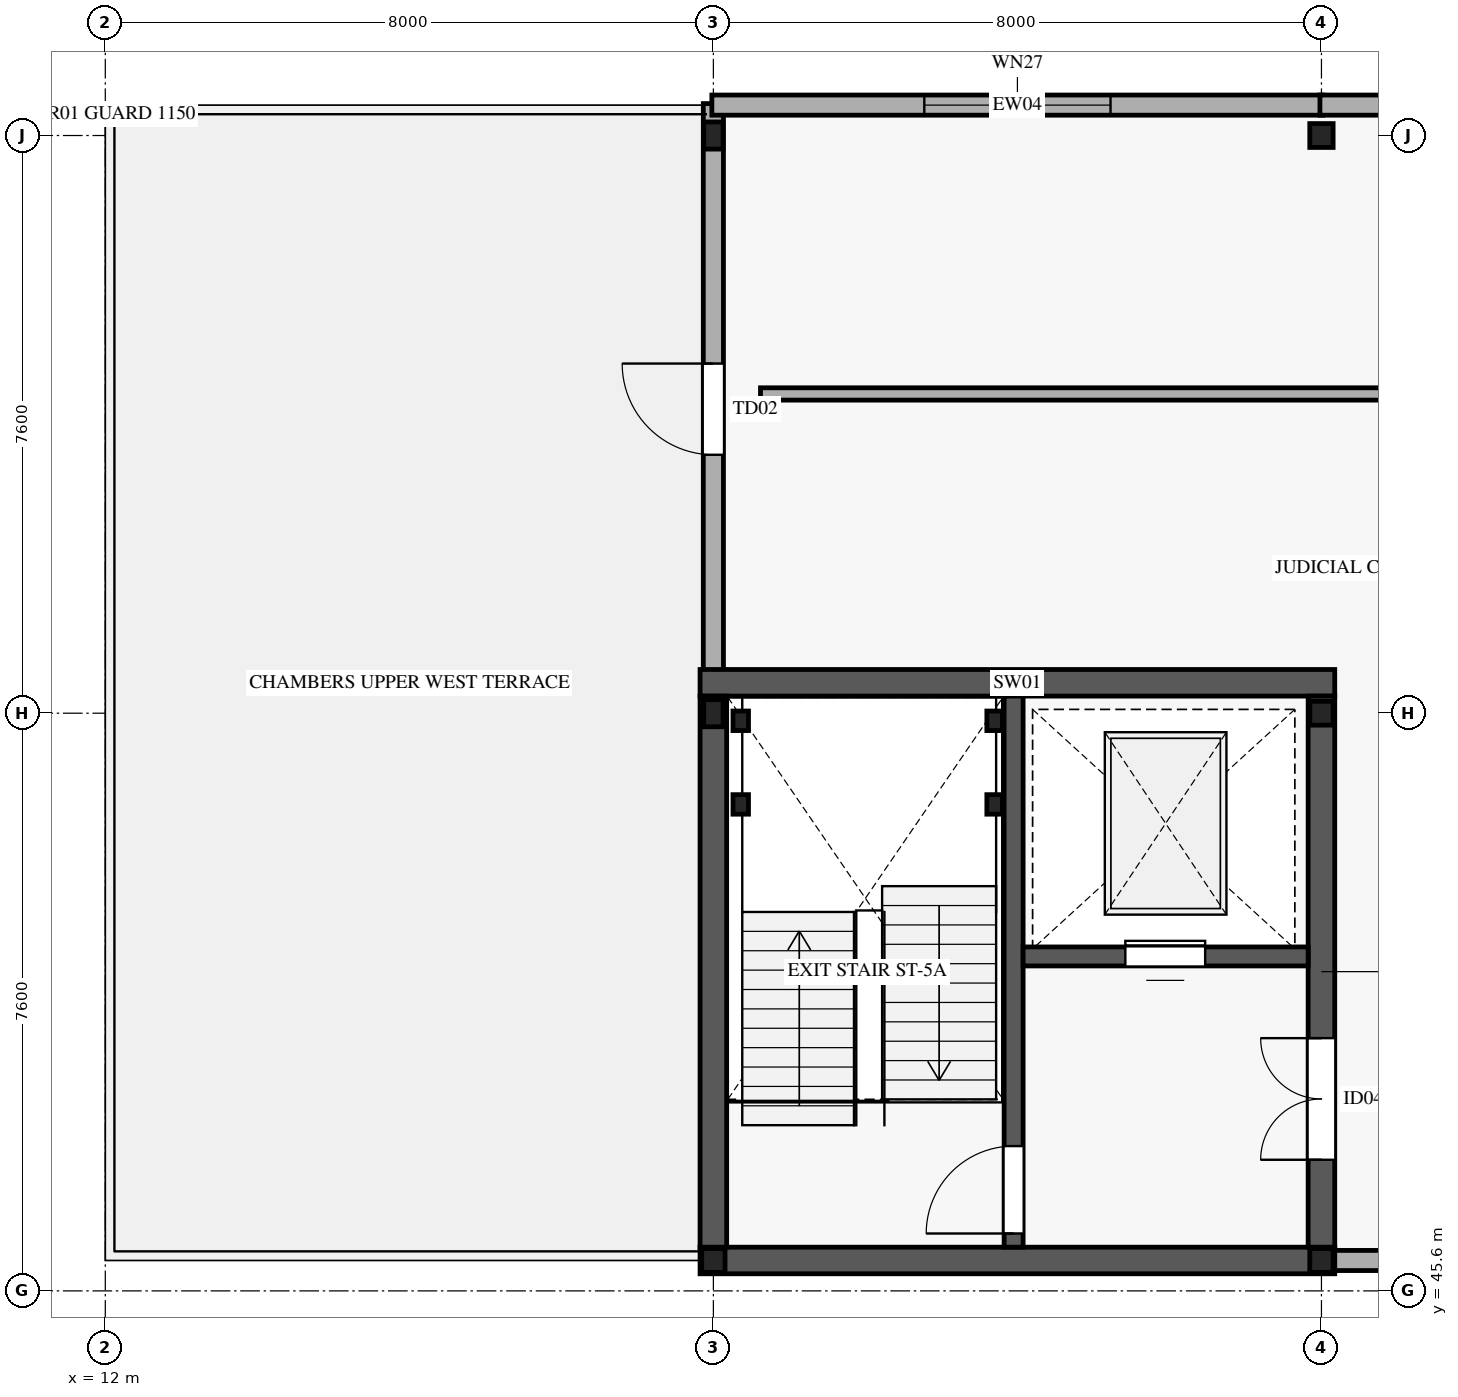
"""IFC4 building model, lengths in metres.
Left out: names, types, materials, properties, quantities, classifications, styles, units other than length and angle.
Written with IfcOpenShell. Run it as: python <this file> out.ifc"""

import sys

from ifc_helpers import new_model, si_unit, direction, frame, frame_2d, origin, origin_2d, place, context, subcontext, project, spatial, rectangle, i_section, extrude, element, fill, save


model = new_model("IFC4")
c1 = context("Model", 3, precision=1e-05, world=origin(), true_north=direction((0.0, 1.0)))
c2 = subcontext(c1, "Body", "Model", "MODEL_VIEW")
j1 = project(units=[si_unit("LENGTHUNIT", "METRE"), si_unit("PLANEANGLEUNIT", "RADIAN")], contexts=[c1])
p1 = place(None, origin())
s1 = spatial("IfcSite", under=j1, at=p1, CompositionType="ELEMENT")
p2 = place(p1, origin())
s2 = spatial("IfcBuilding", under=s1, at=p2, CompositionType="ELEMENT")
p3 = place(p2, frame((0.0, 0.0, 33.6)))
s3 = spatial("IfcBuildingStorey", under=s2, at=p3, CompositionType="ELEMENT", Elevation=33.6)
p4 = place(p3, frame((20.0, 46.0, 0.0), z_axis=(0.0, 0.0, 1.0), x_axis=(1.0, 0.0, 0.0)))
e1 = element("IfcColumn", 1, at=p4, inside=s3, PredefinedType="COLUMN", context=c2, shape_type="SweptSolid", body=[
    extrude(i_section(OverallWidth=0.307, OverallDepth=0.314, WebThickness=0.012, FlangeThickness=0.019, FilletRadius=0.015, at=origin_2d()), origin(), (0.0, 0.0, 1.0), 3.995),
])
for number, where, z_axis, x_axis in (
    (2, (20.0, 53.2, 0.0), (0.0, 0.0, 1.0), (1.0, 0.0, 0.0)),
    (3, (20.0, 60.8, 0.0), (0.0, 0.0, 1.0), (1.0, 0.0, 0.0)),
):
    element("IfcColumn", number, at=place(p3, frame(where, z_axis=z_axis, x_axis=x_axis)), inside=s3, PredefinedType="COLUMN", context=c2, shape_type="SweptSolid", body=[
        extrude(i_section(OverallWidth=0.255, OverallDepth=0.357, WebThickness=0.01, FlangeThickness=0.018, FilletRadius=0.015, at=origin_2d()), origin(), (0.0, 0.0, 1.0), 3.995),
    ])
for number, where, z_axis, x_axis in (
    (4, (28.0, 46.0, 0.0), (0.0, 0.0, 1.0), (1.0, 0.0, 0.0)),
    (5, (28.0, 53.2, 0.0), (0.0, 0.0, 1.0), (1.0, 0.0, 0.0)),
    (6, (28.0, 60.8, 0.0), (0.0, 0.0, 1.0), (1.0, 0.0, 0.0)),
):
    element("IfcColumn", number, at=place(p3, frame(where, z_axis=z_axis, x_axis=x_axis)), inside=s3, PredefinedType="COLUMN", context=c2, shape_type="SweptSolid", body=[
        extrude(i_section(OverallWidth=0.307, OverallDepth=0.314, WebThickness=0.012, FlangeThickness=0.019, FilletRadius=0.015, at=origin_2d()), origin(), (0.0, 0.0, 1.0), 3.995),
    ])
p5 = place(p3, frame((20.0, 53.18, 0.0), z_axis=(0.0, 0.0, 1.0), x_axis=(0.0, 1.0, 0.0)))
e7 = element("IfcWall", 7, at=p5, inside=s3, PredefinedType="STANDARD", context=c2, shape_type="SweptSolid", body=[
    extrude(rectangle(XDim=8.04, YDim=0.265, at=frame_2d((4.02, 0.0))), origin(), (0.0, 0.0, 1.0), 3.06),
])
p6 = place(p5, frame((3.42, 0.0, 0.0)))
e8 = element("IfcOpeningElement", 8, at=p6, cuts=e7, PredefinedType="OPENING", context=c2, shape_type="SweptSolid", body=[
    extrude(rectangle(XDim=1.2, YDim=2.2, at=frame_2d((0.6, 1.1))), frame((0.0, 0.142, 0.0), z_axis=(0.0, -1.0, 0.0), x_axis=(1.0, 0.0, 0.0)), (0.0, 0.0, 1.0), 0.285),
])
p7 = place(p3, frame((19.98, 61.2, 0.0), z_axis=(0.0, 0.0, 1.0), x_axis=(1.0, 0.0, 0.0)))
e9 = element("IfcWall", 9, at=p7, inside=s3, PredefinedType="STANDARD", context=c2, shape_type="SweptSolid", body=[
    extrude(rectangle(XDim=8.04, YDim=0.265, at=frame_2d((4.02, 0.0))), origin(), (0.0, 0.0, 1.0), 3.06),
])
p8 = place(p7, frame((2.795, 0.0, 0.75)))
e10 = element("IfcOpeningElement", 10, at=p8, cuts=e9, PredefinedType="OPENING", context=c2, shape_type="SweptSolid", body=[
    extrude(rectangle(XDim=2.45, YDim=1.55, at=frame_2d((1.225, 0.775))), frame((0.0, 0.142, 0.0), z_axis=(0.0, -1.0, 0.0), x_axis=(1.0, 0.0, 0.0)), (0.0, 0.0, 1.0), 0.285),
])
p9 = place(p3, frame((27.98, 61.2, 0.0), z_axis=(0.0, 0.0, 1.0), x_axis=(1.0, 0.0, 0.0)))
e11 = element("IfcWall", 11, at=p9, inside=s3, PredefinedType="STANDARD", context=c2, shape_type="SweptSolid", body=[
    extrude(rectangle(XDim=8.04, YDim=0.265, at=frame_2d((4.02, 0.0))), origin(), (0.0, 0.0, 1.0), 3.06),
])
p10 = place(p9, frame((2.595, 0.0, 0.75)))
e12 = element("IfcOpeningElement", 12, at=p10, cuts=e11, PredefinedType="OPENING", context=c2, shape_type="SweptSolid", body=[
    extrude(rectangle(XDim=2.85, YDim=1.55, at=frame_2d((1.425, 0.775))), frame((0.0, 0.142, 0.0), z_axis=(0.0, -1.0, 0.0), x_axis=(1.0, 0.0, 0.0)), (0.0, 0.0, 1.0), 0.285),
])
p11 = place(p3, frame((36.02, 46.0, 0.0), z_axis=(0.0, 0.0, 1.0), x_axis=(-1.0, 0.0, 0.0)))
e13 = element("IfcWall", 13, at=p11, inside=s3, PredefinedType="STANDARD", context=c2, shape_type="SweptSolid", body=[
    extrude(rectangle(XDim=8.04, YDim=0.265, at=frame_2d((4.02, 0.0))), origin(), (0.0, 0.0, 1.0), 3.06),
])
p12 = place(p11, frame((3.22, 0.0, 0.75)))
e14 = element("IfcOpeningElement", 14, at=p12, cuts=e13, PredefinedType="OPENING", context=c2, shape_type="SweptSolid", body=[
    extrude(rectangle(XDim=1.6, YDim=2.0, at=frame_2d((0.8, 1.0))), frame((0.0, 0.142, 0.0), z_axis=(0.0, -1.0, 0.0), x_axis=(1.0, 0.0, 0.0)), (0.0, 0.0, 1.0), 0.285),
])
for number, where, z_axis, x_axis in (
    (15, (19.825, 46.0, 0.0), (0.0, 0.0, 1.0), (1.0, 0.0, 0.0)),
    (16, (19.825, 53.6, 0.0), (0.0, 0.0, 1.0), (1.0, 0.0, 0.0)),
):
    element("IfcWall", number, at=place(p3, frame(where, z_axis=z_axis, x_axis=x_axis)), inside=s3, PredefinedType="SHEAR", context=c2, shape_type="SweptSolid", body=[
        extrude(rectangle(XDim=8.35, YDim=0.35, at=frame_2d((4.175, 0.0))), origin(), (0.0, 0.0, 1.0), 3.99),
    ])
p13 = place(p3, frame((20.0, 46.175, 0.0), z_axis=(0.0, 0.0, 1.0), x_axis=(0.0, 1.0, 0.0)))
e17 = element("IfcWall", 17, at=p13, inside=s3, PredefinedType="SHEAR", context=c2, shape_type="SweptSolid", body=[
    extrude(rectangle(XDim=7.25, YDim=0.35, at=frame_2d((3.625, 0.0))), origin(), (0.0, 0.0, 1.0), 3.99),
])
p14 = place(p3, frame((28.0, 46.175, 0.0), z_axis=(0.0, 0.0, 1.0), x_axis=(0.0, 1.0, 0.0)))
e18 = element("IfcWall", 18, at=p14, inside=s3, PredefinedType="SHEAR", context=c2, shape_type="SweptSolid", body=[
    extrude(rectangle(XDim=7.25, YDim=0.35, at=frame_2d((3.625, 0.0))), origin(), (0.0, 0.0, 1.0), 3.99),
])
p15 = place(p14, frame((1.15, 0.0, 0.0)))
e19 = element("IfcOpeningElement", 19, at=p15, cuts=e18, PredefinedType="OPENING", context=c2, shape_type="SweptSolid", body=[
    extrude(rectangle(XDim=1.6, YDim=2.35, at=frame_2d((0.8, 1.175))), frame((0.0, 0.185, 0.0), z_axis=(0.0, -1.0, 0.0), x_axis=(1.0, 0.0, 0.0)), (0.0, 0.0, 1.0), 0.37),
])
p16 = place(p3, frame((23.95, 46.175, 0.0), z_axis=(0.0, 0.0, 1.0), x_axis=(0.0, 1.0, 0.0)))
e20 = element("IfcWall", 20, at=p16, inside=s3, PredefinedType="SHEAR", context=c2, shape_type="SweptSolid", body=[
    extrude(rectangle(XDim=7.25, YDim=0.25, at=frame_2d((3.625, 0.0))), origin(), (0.0, 0.0, 1.0), 3.99),
])
p17 = place(p16, frame((0.18, 0.0, 0.0)))
e21 = element("IfcOpeningElement", 21, at=p17, cuts=e20, PredefinedType="OPENING", context=c2, shape_type="SweptSolid", body=[
    extrude(rectangle(XDim=1.15, YDim=2.2, at=frame_2d((0.575, 1.1))), frame((0.0, 0.135, 0.0), z_axis=(0.0, -1.0, 0.0), x_axis=(1.0, 0.0, 0.0)), (0.0, 0.0, 1.0), 0.27),
])
p18 = place(p3, frame((24.075, 50.0, 0.0), z_axis=(0.0, 0.0, 1.0), x_axis=(1.0, 0.0, 0.0)))
e22 = element("IfcWall", 22, at=p18, inside=s3, PredefinedType="SHEAR", context=c2, shape_type="SweptSolid", body=[
    extrude(rectangle(XDim=3.75, YDim=0.25, at=frame_2d((1.875, 0.0))), origin(), (0.0, 0.0, 1.0), 3.99),
])
p19 = place(p18, frame((1.345, 0.0, 0.0)))
e23 = element("IfcOpeningElement", 23, at=p19, cuts=e22, PredefinedType="OPENING", context=c2, shape_type="SweptSolid", body=[
    extrude(rectangle(XDim=1.05, YDim=2.2, at=frame_2d((0.525, 1.1))), frame((0.0, 0.135, 0.0), z_axis=(0.0, -1.0, 0.0), x_axis=(1.0, 0.0, 0.0)), (0.0, 0.0, 1.0), 0.27),
])
for number, where, z_axis, x_axis in (
    (24, (20.36, 52.0, 0.0), (0.0, 0.0, 1.0), (1.0, 0.0, 0.0)),
    (25, (23.7, 52.0, 0.0), (0.0, 0.0, 1.0), (1.0, 0.0, 0.0)),
    (26, (20.36, 53.1, 0.0), (0.0, 0.0, 1.0), (1.0, 0.0, 0.0)),
    (27, (23.7, 53.1, 0.0), (0.0, 0.0, 1.0), (1.0, 0.0, 0.0)),
):
    element("IfcColumn", number, at=place(p3, frame(where, z_axis=z_axis, x_axis=x_axis)), inside=s3, PredefinedType="COLUMN", context=c2, shape_type="SweptSolid", body=[
        extrude(i_section(OverallWidth=0.204, OverallDepth=0.257, WebThickness=0.009, FlangeThickness=0.016, FilletRadius=0.013, at=origin_2d()), origin(), (0.0, 0.0, 1.0), 4.195),
    ])
p20 = place(p3, frame((20.62, 57.4, 0.0), z_axis=(0.0, 0.0, 1.0), x_axis=(1.0, 0.0, 0.0)))
e28 = element("IfcWall", 28, at=p20, inside=s3, PredefinedType="PARTITIONING", context=c2, shape_type="SweptSolid", body=[
    extrude(rectangle(XDim=29.16, YDim=0.162, at=frame_2d((14.58, 0.0))), origin(), (0.0, 0.0, 1.0), 2.85),
])
p21 = place(p20, frame((14.005, 0.0, 0.0)))
e29 = element("IfcOpeningElement", 29, at=p21, cuts=e28, PredefinedType="OPENING", context=c2, shape_type="SweptSolid", body=[
    extrude(rectangle(XDim=1.15, YDim=2.15, at=frame_2d((0.575, 1.075))), frame((0.0, 0.091, 0.0), z_axis=(0.0, -1.0, 0.0), x_axis=(1.0, 0.0, 0.0)), (0.0, 0.0, 1.0), 0.182),
])
p22 = place(p6, origin())
e30 = element("IfcDoor", 30, at=p22, inside=s3, OperationType="SINGLE_SWING_RIGHT", PredefinedType="DOOR", context=c2, shape_type="SweptSolid", body=[
    extrude(rectangle(XDim=1.2, YDim=2.2, at=frame_2d((0.6, 1.1))), frame((0.0, 0.025, 0.0), z_axis=(0.0, -1.0, 0.0), x_axis=(1.0, 0.0, 0.0)), (0.0, 0.0, 1.0), 0.05),
])
fill(e8, e30)
p23 = place(p8, origin())
e31 = element("IfcWindow", 31, at=p23, inside=s3, PartitioningType="SINGLE_PANEL", PredefinedType="WINDOW", context=c2, shape_type="SweptSolid", body=[
    extrude(rectangle(XDim=2.45, YDim=1.55, at=frame_2d((1.225, 0.775))), frame((0.0, 0.03, 0.0), z_axis=(0.0, -1.0, 0.0), x_axis=(1.0, 0.0, 0.0)), (0.0, 0.0, 1.0), 0.06),
])
fill(e10, e31)
p24 = place(p17, origin())
e32 = element("IfcDoor", 32, at=p24, inside=s3, OperationType="SINGLE_SWING_LEFT", PredefinedType="DOOR", context=c2, shape_type="SweptSolid", body=[
    extrude(rectangle(XDim=1.15, YDim=2.2, at=frame_2d((0.575, 1.1))), frame((0.0, 0.025, 0.0), z_axis=(0.0, -1.0, 0.0), x_axis=(1.0, 0.0, 0.0)), (0.0, 0.0, 1.0), 0.05),
])
fill(e21, e32)
p25 = place(p15, origin())
e33 = element("IfcDoor", 33, at=p25, inside=s3, OperationType="DOUBLE_DOOR_SINGLE_SWING", PredefinedType="DOOR", context=c2, shape_type="SweptSolid", body=[
    extrude(rectangle(XDim=1.6, YDim=2.35, at=frame_2d((0.8, 1.175))), frame((0.0, 0.025, 0.0), z_axis=(0.0, -1.0, 0.0), x_axis=(1.0, 0.0, 0.0)), (0.0, 0.0, 1.0), 0.05),
])
fill(e19, e33)
p26 = place(p19, origin())
e34 = element("IfcDoor", 34, at=p26, inside=s3, OperationType="SLIDING_TO_RIGHT", PredefinedType="DOOR", context=c2, shape_type="SweptSolid", body=[
    extrude(rectangle(XDim=1.05, YDim=2.2, at=frame_2d((0.525, 1.1))), frame((0.0, 0.025, 0.0), z_axis=(0.0, -1.0, 0.0), x_axis=(1.0, 0.0, 0.0)), (0.0, 0.0, 1.0), 0.05),
])
fill(e23, e34)
save(model, sys.argv[1])
